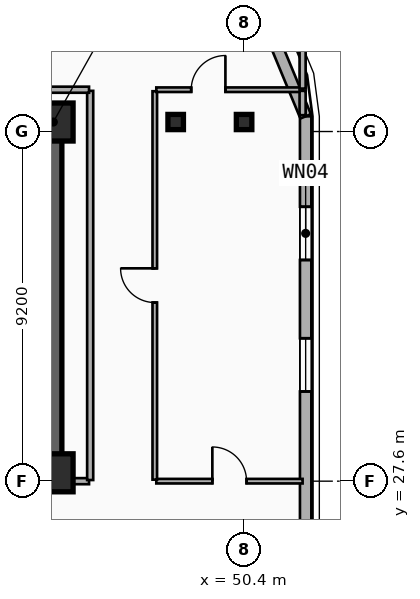
"""IFC4 building model, lengths in metres.
Left out: names, types, materials, properties, quantities, classifications, styles, units other than length and angle.
Written with IfcOpenShell. Run it as: python <this file> out.ifc"""

import sys

from ifc_helpers import new_model, si_unit, direction, frame, frame_2d, origin, origin_2d, place, context, subcontext, project, spatial, rectangle, i_section, extrude, element, fill, save


model = new_model("IFC4")
c1 = context("Model", 3, precision=1e-05, world=origin(), true_north=direction((0.0, 1.0)))
c2 = subcontext(c1, "Body", "Model", "MODEL_VIEW")
j1 = project(units=[si_unit("LENGTHUNIT", "METRE"), si_unit("PLANEANGLEUNIT", "RADIAN")], contexts=[c1])
p1 = place(None, origin())
s1 = spatial("IfcSite", under=j1, at=p1, CompositionType="ELEMENT")
p2 = place(p1, origin())
s2 = spatial("IfcBuilding", under=s1, at=p2, CompositionType="ELEMENT")
p3 = place(p2, frame((0.0, 0.0, 225.6)))
s3 = spatial("IfcBuildingStorey", under=s2, at=p3, CompositionType="ELEMENT", Elevation=225.6)
p4 = place(p3, frame((12.15, 37.05, 0.0), z_axis=(0.0, 0.0, 1.0), x_axis=(1.0, 0.0, 0.0)))
e1 = element("IfcWall", 1, at=p4, inside=s3, PredefinedType="SHEAR", context=c2, shape_type="SweptSolid", body=[
    extrude(rectangle(XDim=33.23, YDim=0.45, at=frame_2d((16.615, 0.0))), origin(), (0.0, 0.0, 1.0), 3.6),
])
p5 = place(p3, frame((45.38, 27.82, 0.0), z_axis=(0.0, 0.0, 1.0), x_axis=(-1.0, 0.0, 0.0)))
e2 = element("IfcWall", 2, at=p5, inside=s3, PredefinedType="SHEAR", context=c2, shape_type="SweptSolid", body=[
    extrude(rectangle(XDim=12.23, YDim=0.45, at=frame_2d((6.115, 0.0))), origin(), (0.0, 0.0, 1.0), 3.6),
])
p6 = place(p5, frame((9.93, 0.0, 0.0)))
e3 = element("IfcOpeningElement", 3, at=p6, cuts=e2, PredefinedType="OPENING", context=c2, shape_type="SweptSolid", body=[
    extrude(rectangle(XDim=1.1, YDim=2.15, at=frame_2d((0.55, 1.075))), frame((0.0, 0.235, 0.0), z_axis=(0.0, -1.0, 0.0), x_axis=(1.0, 0.0, 0.0)), (0.0, 0.0, 1.0), 0.47),
])
p7 = place(p5, frame((6.23, 0.0, 0.0)))
e4 = element("IfcOpeningElement", 4, at=p7, cuts=e2, PredefinedType="OPENING", context=c2, shape_type="SweptSolid", body=[
    extrude(rectangle(XDim=1.1, YDim=2.15, at=frame_2d((0.55, 1.075))), frame((0.0, 0.235, 0.0), z_axis=(0.0, -1.0, 0.0), x_axis=(1.0, 0.0, 0.0)), (0.0, 0.0, 1.0), 0.47),
])
p8 = place(p3, frame((45.38, 28.045, 0.0), z_axis=(0.0, 0.0, 1.0), x_axis=(0.0, 1.0, 0.0)))
e5 = element("IfcWall", 5, at=p8, inside=s3, PredefinedType="SHEAR", context=c2, shape_type="SweptSolid", body=[
    extrude(rectangle(XDim=8.78, YDim=0.45, at=frame_2d((4.39, 0.0))), origin(), (0.0, 0.0, 1.0), 3.6),
])
for number, where, z_axis, x_axis in (
    (6, (45.4, 27.82, 0.0), (0.0, 0.0, 1.0), (1.0, 0.0, 0.0)),
    (7, (45.4, 37.05, 0.0), (0.0, 0.0, 1.0), (1.0, 0.0, 0.0)),
):
    element("IfcColumn", number, at=place(p3, frame(where, z_axis=z_axis, x_axis=x_axis)), inside=s3, PredefinedType="COLUMN", context=c2, shape_type="SweptSolid", body=[
        extrude(rectangle(XDim=1.0, YDim=1.0, at=origin_2d()), origin(), (0.0, 0.0, 1.0), 3.6),
    ])
for number, where, z_axis, x_axis in (
    (8, (48.6, 37.05, 0.0), (0.0, 0.0, 1.0), (1.0, 0.0, 0.0)),
    (9, (50.4, 37.05, 0.0), (0.0, 0.0, 1.0), (1.0, 0.0, 0.0)),
):
    element("IfcColumn", number, at=place(p3, frame(where, z_axis=z_axis, x_axis=x_axis)), inside=s3, PredefinedType="COLUMN", context=c2, shape_type="SweptSolid", body=[
        extrude(i_section(OverallWidth=0.408, OverallDepth=0.4, WebThickness=0.025, FlangeThickness=0.039, FilletRadius=0.015, at=origin_2d()), origin(), (0.0, 0.0, 1.0), 3.6),
    ])
p9 = place(p3, frame((52.02, 37.2, 0.0), z_axis=(0.0, 0.0, 1.0), x_axis=(0.0, -1.0, 0.0)))
e10 = element("IfcWall", 10, at=p9, inside=s3, PredefinedType="SOLIDWALL", context=c2, shape_type="SweptSolid", body=[
    extrude(rectangle(XDim=28.6, YDim=0.3, at=frame_2d((14.3, 0.0))), origin(), (0.0, 0.0, 1.0), 3.34),
])
p10 = place(p9, frame((2.38, 0.0, 0.34)))
e11 = element("IfcOpeningElement", 11, at=p10, cuts=e10, PredefinedType="OPENING", context=c2, shape_type="SweptSolid", body=[
    extrude(rectangle(XDim=1.4, YDim=2.1, at=frame_2d((0.7, 1.05))), frame((0.0, 0.16, 0.0), z_axis=(0.0, -1.0, 0.0), x_axis=(1.0, 0.0, 0.0)), (0.0, 0.0, 1.0), 0.32),
])
p11 = place(p9, frame((5.84, 0.0, 0.34)))
e12 = element("IfcOpeningElement", 12, at=p11, cuts=e10, PredefinedType="OPENING", context=c2, shape_type="SweptSolid", body=[
    extrude(rectangle(XDim=1.4, YDim=2.1, at=frame_2d((0.7, 1.05))), frame((0.0, 0.16, 0.0), z_axis=(0.0, -1.0, 0.0), x_axis=(1.0, 0.0, 0.0)), (0.0, 0.0, 1.0), 0.32),
])
p12 = place(p9, frame((24.529, 0.0, 0.34)))
e13 = element("IfcOpeningElement", 13, at=p12, cuts=e10, PredefinedType="OPENING", context=c2, shape_type="SweptSolid", body=[
    extrude(rectangle(XDim=1.4, YDim=2.1, at=frame_2d((0.7, 1.05))), frame((0.0, 0.16, 0.0), z_axis=(0.0, -1.0, 0.0), x_axis=(1.0, 0.0, 0.0)), (0.0, 0.0, 1.0), 0.32),
])
p13 = place(p9, frame((20.521, 0.0, 0.34)))
e14 = element("IfcOpeningElement", 14, at=p13, cuts=e10, PredefinedType="OPENING", context=c2, shape_type="SweptSolid", body=[
    extrude(rectangle(XDim=1.4, YDim=2.1, at=frame_2d((0.7, 1.05))), frame((0.0, 0.16, 0.0), z_axis=(0.0, -1.0, 0.0), x_axis=(1.0, 0.0, 0.0)), (0.0, 0.0, 1.0), 0.32),
])
p14 = place(p9, frame((16.733, 0.0, 0.34)))
e15 = element("IfcOpeningElement", 15, at=p14, cuts=e10, PredefinedType="OPENING", context=c2, shape_type="SweptSolid", body=[
    extrude(rectangle(XDim=1.4, YDim=2.1, at=frame_2d((0.7, 1.05))), frame((0.0, 0.16, 0.0), z_axis=(0.0, -1.0, 0.0), x_axis=(1.0, 0.0, 0.0)), (0.0, 0.0, 1.0), 0.32),
])
p15 = place(p9, frame((12.945, 0.0, 0.34)))
e16 = element("IfcOpeningElement", 16, at=p15, cuts=e10, PredefinedType="OPENING", context=c2, shape_type="SweptSolid", body=[
    extrude(rectangle(XDim=1.4, YDim=2.1, at=frame_2d((0.7, 1.05))), frame((0.0, 0.16, 0.0), z_axis=(0.0, -1.0, 0.0), x_axis=(1.0, 0.0, 0.0)), (0.0, 0.0, 1.0), 0.32),
])
p16 = place(p3, frame((50.843, 40.042, 0.0), z_axis=(0.0, 0.0, 1.0), x_axis=(0.382704529509, -0.923870793506, 0.0)))
e17 = element("IfcWall", 17, at=p16, inside=s3, PredefinedType="SOLIDWALL", context=c2, shape_type="SweptSolid", body=[
    extrude(rectangle(XDim=3.077, YDim=0.3, at=frame_2d((1.538, 0.0))), origin(), (0.0, 0.0, 1.0), 3.34),
])
p17 = place(p3, frame((48.09, 27.6, 0.0), z_axis=(0.0, 0.0, 1.0), x_axis=(1.0, 0.0, 0.0)))
e18 = element("IfcWall", 18, at=p17, inside=s3, PredefinedType="PARTITIONING", context=c2, shape_type="SweptSolid", body=[
    extrude(rectangle(XDim=3.85, YDim=0.12, at=frame_2d((1.925, 0.0))), origin(), (0.0, 0.0, 1.0), 2.67),
])
p18 = place(p17, frame((1.475, 0.0, 0.0)))
e19 = element("IfcOpeningElement", 19, at=p18, cuts=e18, PredefinedType="OPENING", context=c2, shape_type="SweptSolid", body=[
    extrude(rectangle(XDim=0.9, YDim=2.1, at=frame_2d((0.45, 1.05))), frame((0.0, 0.07, 0.0), z_axis=(0.0, -1.0, 0.0), x_axis=(1.0, 0.0, 0.0)), (0.0, 0.0, 1.0), 0.14),
])
p19 = place(p3, frame((48.05, 27.64, 0.0), z_axis=(0.0, 0.0, 1.0), x_axis=(0.0, 1.0, 0.0)))
e20 = element("IfcWall", 20, at=p19, inside=s3, PredefinedType="PARTITIONING", context=c2, shape_type="SweptSolid", body=[
    extrude(rectangle(XDim=10.22, YDim=0.12, at=frame_2d((5.11, 0.0))), origin(), (0.0, 0.0, 1.0), 2.82),
])
p20 = place(p19, frame((4.66, 0.0, 0.0)))
e21 = element("IfcOpeningElement", 21, at=p20, cuts=e20, PredefinedType="OPENING", context=c2, shape_type="SweptSolid", body=[
    extrude(rectangle(XDim=0.9, YDim=2.1, at=frame_2d((0.45, 1.05))), frame((0.0, 0.07, 0.0), z_axis=(0.0, -1.0, 0.0), x_axis=(1.0, 0.0, 0.0)), (0.0, 0.0, 1.0), 0.14),
])
p21 = place(p3, frame((48.09, 37.9, 0.0), z_axis=(0.0, 0.0, 1.0), x_axis=(1.0, 0.0, 0.0)))
e22 = element("IfcWall", 22, at=p21, inside=s3, PredefinedType="PARTITIONING", context=c2, shape_type="SweptSolid", body=[
    extrude(rectangle(XDim=3.85, YDim=0.12, at=frame_2d((1.925, 0.0))), origin(), (0.0, 0.0, 1.0), 3.34),
])
p22 = place(p21, frame((0.919, 0.0, 0.0)))
e23 = element("IfcOpeningElement", 23, at=p22, cuts=e22, PredefinedType="OPENING", context=c2, shape_type="SweptSolid", body=[
    extrude(rectangle(XDim=0.9, YDim=2.1, at=frame_2d((0.45, 1.05))), frame((0.0, 0.07, 0.0), z_axis=(0.0, -1.0, 0.0), x_axis=(1.0, 0.0, 0.0)), (0.0, 0.0, 1.0), 0.14),
])
p23 = place(p3, frame((45.41, 27.6, 0.0), z_axis=(0.0, 0.0, 1.0), x_axis=(1.0, 0.0, 0.0)))
e24 = element("IfcWall", 24, at=p23, inside=s3, PredefinedType="PARTITIONING", context=c2, shape_type="SweptSolid", body=[
    extrude(rectangle(XDim=0.91, YDim=0.16, at=frame_2d((0.455, 0.0))), origin(), (0.0, 0.0, 1.0), 2.41),
])
p24 = place(p3, frame((46.35, 27.63, 0.0), z_axis=(0.0, 0.0, 1.0), x_axis=(0.0, 1.0, 0.0)))
e25 = element("IfcWall", 25, at=p24, inside=s3, PredefinedType="PARTITIONING", context=c2, shape_type="SweptSolid", body=[
    extrude(rectangle(XDim=10.24, YDim=0.16, at=frame_2d((5.12, 0.0))), origin(), (0.0, 0.0, 1.0), 2.82),
])
p25 = place(p3, frame((11.28, 37.9, 0.0), z_axis=(0.0, 0.0, 1.0), x_axis=(1.0, 0.0, 0.0)))
e26 = element("IfcWall", 26, at=p25, inside=s3, PredefinedType="PARTITIONING", context=c2, shape_type="SweptSolid", body=[
    extrude(rectangle(XDim=35.04, YDim=0.16, at=frame_2d((17.52, 0.0))), origin(), (0.0, 0.0, 1.0), 3.34),
])
p26 = place(p3, frame((51.94, 37.93, 0.0), z_axis=(0.0, 0.0, 1.0), x_axis=(0.0, 1.0, 0.0)))
e27 = element("IfcWall", 27, at=p26, inside=s3, PredefinedType="PARTITIONING", context=c2, shape_type="SweptSolid", body=[
    extrude(rectangle(XDim=1.44, YDim=0.16, at=frame_2d((0.72, 0.0))), origin(), (0.0, 0.0, 1.0), 3.34),
])
p27 = place(p3, frame((51.94, 37.23, 0.0), z_axis=(0.0, 0.0, 1.0), x_axis=(0.0, 1.0, 0.0)))
e28 = element("IfcWall", 28, at=p27, inside=s3, PredefinedType="PARTITIONING", context=c2, shape_type="SweptSolid", body=[
    extrude(rectangle(XDim=0.64, YDim=0.16, at=frame_2d((0.32, 0.0))), origin(), (0.0, 0.0, 1.0), 3.34),
])
p28 = place(p10, origin())
e29 = element("IfcWindow", 29, at=p28, inside=s3, PartitioningType="SINGLE_PANEL", PredefinedType="WINDOW", context=c2, shape_type="SweptSolid", body=[
    extrude(rectangle(XDim=1.4, YDim=2.1, at=frame_2d((0.7, 1.05))), frame((0.0, 0.03, 0.0), z_axis=(0.0, -1.0, 0.0), x_axis=(1.0, 0.0, 0.0)), (0.0, 0.0, 1.0), 0.06),
])
fill(e11, e29)
p29 = place(p11, origin())
e30 = element("IfcWindow", 30, at=p29, inside=s3, PartitioningType="SINGLE_PANEL", PredefinedType="WINDOW", context=c2, shape_type="SweptSolid", body=[
    extrude(rectangle(XDim=1.4, YDim=2.1, at=frame_2d((0.7, 1.05))), frame((0.0, 0.03, 0.0), z_axis=(0.0, -1.0, 0.0), x_axis=(1.0, 0.0, 0.0)), (0.0, 0.0, 1.0), 0.06),
])
fill(e12, e30)
p30 = place(p18, origin())
e31 = element("IfcDoor", 31, at=p30, inside=s3, OperationType="SINGLE_SWING_LEFT", PredefinedType="DOOR", context=c2, shape_type="SweptSolid", body=[
    extrude(rectangle(XDim=0.9, YDim=2.1, at=frame_2d((0.45, 1.05))), frame((0.0, 0.025, 0.0), z_axis=(0.0, -1.0, 0.0), x_axis=(1.0, 0.0, 0.0)), (0.0, 0.0, 1.0), 0.05),
])
fill(e19, e31)
p31 = place(p20, origin())
e32 = element("IfcDoor", 32, at=p31, inside=s3, OperationType="SINGLE_SWING_RIGHT", PredefinedType="DOOR", context=c2, shape_type="SweptSolid", body=[
    extrude(rectangle(XDim=0.9, YDim=2.1, at=frame_2d((0.45, 1.05))), frame((0.0, 0.025, 0.0), z_axis=(0.0, -1.0, 0.0), x_axis=(1.0, 0.0, 0.0)), (0.0, 0.0, 1.0), 0.05),
])
fill(e21, e32)
p32 = place(p22, origin())
e33 = element("IfcDoor", 33, at=p32, inside=s3, OperationType="SINGLE_SWING_RIGHT", PredefinedType="DOOR", context=c2, shape_type="SweptSolid", body=[
    extrude(rectangle(XDim=0.9, YDim=2.1, at=frame_2d((0.45, 1.05))), frame((0.0, 0.025, 0.0), z_axis=(0.0, -1.0, 0.0), x_axis=(1.0, 0.0, 0.0)), (0.0, 0.0, 1.0), 0.05),
])
fill(e23, e33)
save(model, sys.argv[1])
